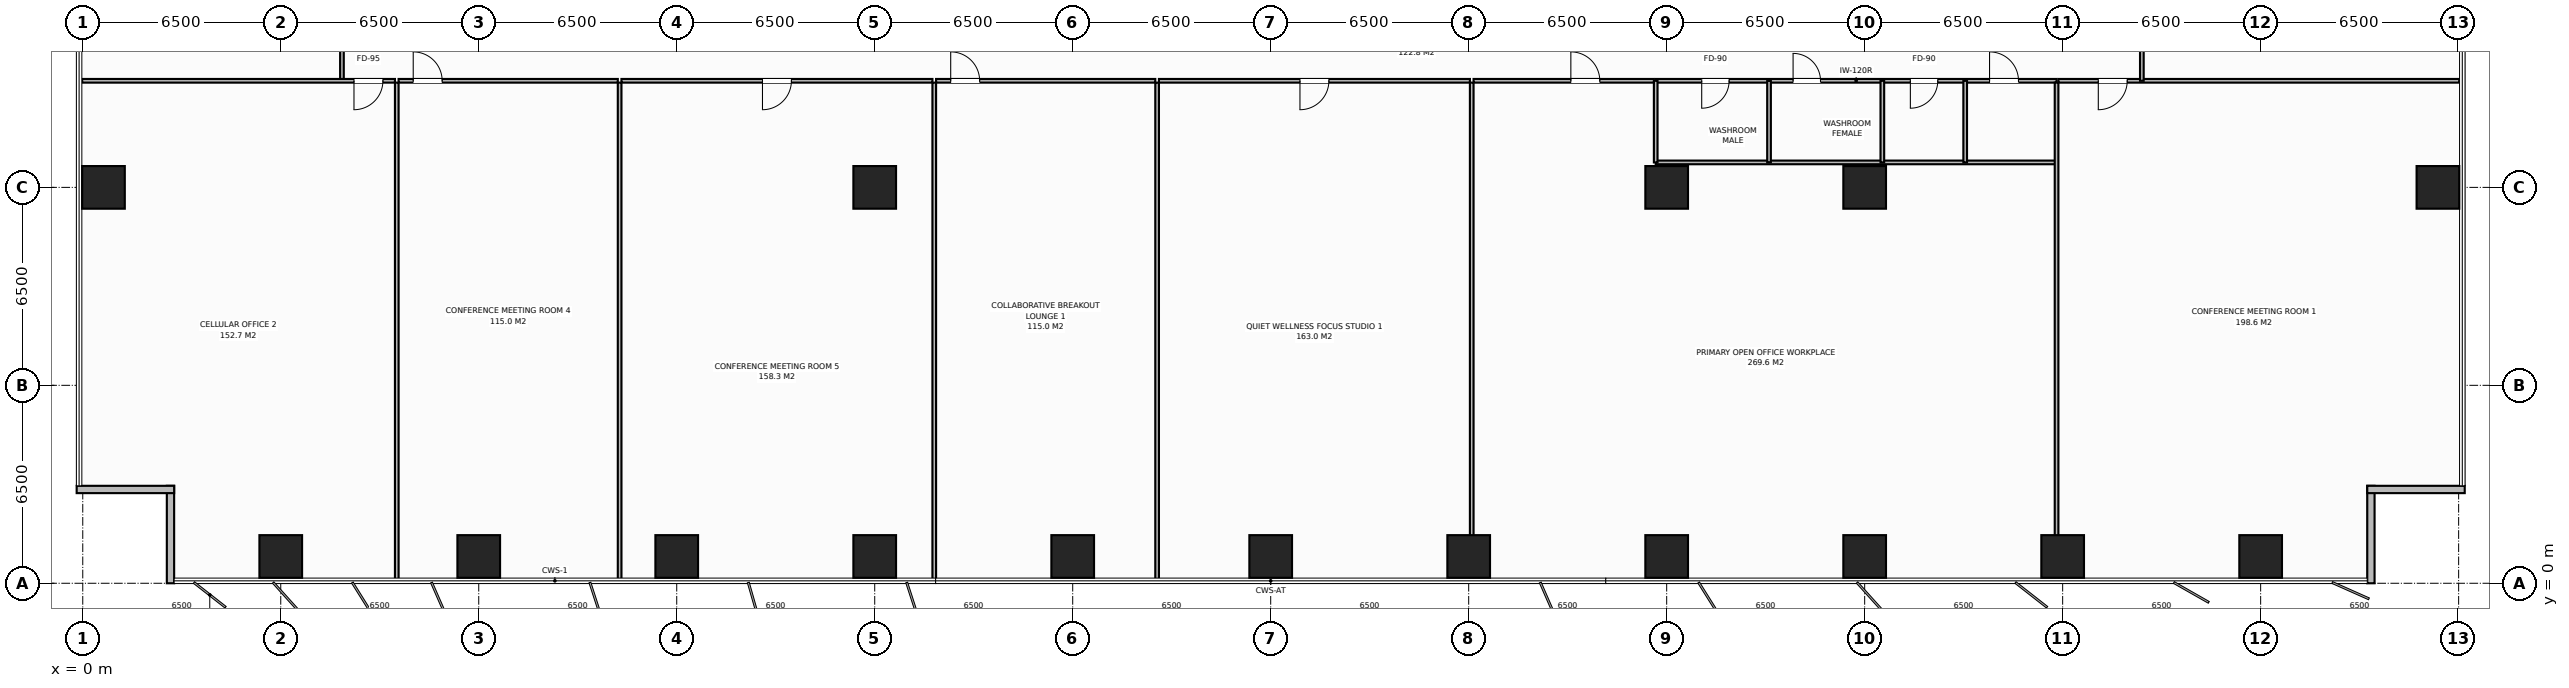
"""IFC4 building model, lengths in metres.
Left out: names, types, materials, properties, quantities, classifications, styles, units other than length and angle.
Written with IfcOpenShell. Run it as: python <this file> out.ifc"""

import sys

from ifc_helpers import new_model, si_unit, direction, frame, frame_2d, origin, origin_2d, place, context, subcontext, project, spatial, rectangle, extrude, element, fill, save


model = new_model("IFC4")
c1 = context("Model", 3, precision=1e-05, world=origin(), true_north=direction((0.0, 1.0)))
c2 = subcontext(c1, "Body", "Model", "MODEL_VIEW")
j1 = project(units=[si_unit("LENGTHUNIT", "METRE"), si_unit("PLANEANGLEUNIT", "RADIAN")], contexts=[c1])
p1 = place(None, origin())
s1 = spatial("IfcSite", under=j1, at=p1, CompositionType="ELEMENT")
p2 = place(p1, origin())
s2 = spatial("IfcBuilding", under=s1, at=p2, CompositionType="ELEMENT")
p3 = place(p2, frame((0.0, 0.0, 65.8)))
s3 = spatial("IfcBuildingStorey", under=s2, at=p3, CompositionType="ELEMENT", Elevation=65.8)
for number, where, z_axis, x_axis in (
    (1, (58.5, 13.0, 0.0), (0.0, 0.0, 1.0), (1.0, 0.0, 0.0)),
    (2, (26.0, 13.0, 0.0), (0.0, 0.0, 1.0), (1.0, 0.0, 0.0)),
    (3, (52.0, 13.0, 0.0), (0.0, 0.0, 1.0), (1.0, 0.0, 0.0)),
    (4, (6.5, 0.88, 0.0), (0.0, 0.0, 1.0), (1.0, 0.0, 0.0)),
    (5, (13.0, 0.88, 0.0), (0.0, 0.0, 1.0), (1.0, 0.0, 0.0)),
    (6, (19.5, 0.88, 0.0), (0.0, 0.0, 1.0), (1.0, 0.0, 0.0)),
    (7, (26.0, 0.88, 0.0), (0.0, 0.0, 1.0), (1.0, 0.0, 0.0)),
    (8, (32.5, 0.88, 0.0), (0.0, 0.0, 1.0), (1.0, 0.0, 0.0)),
    (9, (39.0, 0.88, 0.0), (0.0, 0.0, 1.0), (1.0, 0.0, 0.0)),
    (10, (45.5, 0.88, 0.0), (0.0, 0.0, 1.0), (1.0, 0.0, 0.0)),
    (11, (52.0, 0.88, 0.0), (0.0, 0.0, 1.0), (1.0, 0.0, 0.0)),
    (12, (58.5, 0.88, 0.0), (0.0, 0.0, 1.0), (1.0, 0.0, 0.0)),
    (13, (65.0, 0.88, 0.0), (0.0, 0.0, 1.0), (1.0, 0.0, 0.0)),
    (14, (71.5, 0.88, 0.0), (0.0, 0.0, 1.0), (1.0, 0.0, 0.0)),
    (15, (0.68, 13.0, 0.0), (0.0, 0.0, 1.0), (1.0, 0.0, 0.0)),
    (16, (77.32, 13.0, 0.0), (0.0, 0.0, 1.0), (1.0, 0.0, 0.0)),
):
    element("IfcColumn", number, at=place(p3, frame(where, z_axis=z_axis, x_axis=x_axis)), inside=s3, PredefinedType="COLUMN", context=c2, shape_type="SweptSolid", body=[
        extrude(rectangle(XDim=1.4, YDim=1.4, at=origin_2d()), origin(), (0.0, 0.0, 1.0), 3.8),
    ])
for number, where, z_axis, x_axis in (
    (17, (2.88, 0.0, 0.0), (0.0, 0.0, 1.0), (0.0, 1.0, 0.0)),
    (18, (3.0, 3.08, 0.0), (0.0, 0.0, 1.0), (-1.0, 0.0, 0.0)),
    (19, (75.12, 3.2, 0.0), (0.0, 0.0, 1.0), (0.0, -1.0, 0.0)),
    (20, (78.2, 3.08, 0.0), (0.0, 0.0, 1.0), (-1.0, 0.0, 0.0)),
):
    element("IfcWall", number, at=place(p3, frame(where, z_axis=z_axis, x_axis=x_axis)), inside=s3, PredefinedType="STANDARD", context=c2, shape_type="SweptSolid", body=[
        extrude(rectangle(XDim=3.2, YDim=0.24, at=frame_2d((1.6, 0.0))), origin(), (0.0, 0.0, 1.0), 3.55),
    ])
p4 = place(p3, frame((8.509, 16.5, 0.0), z_axis=(0.0, 0.0, 1.0), x_axis=(0.0, 1.0, 0.0)))
e21 = element("IfcWall", 21, at=p4, inside=s3, PredefinedType="PARTITIONING", context=c2, shape_type="SweptSolid", body=[
    extrude(rectangle(XDim=2.1, YDim=0.12, at=frame_2d((1.05, 0.0))), origin(), (0.0, 0.0, 1.0), 3.55),
])
p5 = place(p3, frame((51.64, 16.5, 0.0), z_axis=(0.0, 0.0, 1.0), x_axis=(1.0, 0.0, 0.0)))
e22 = element("IfcWall", 22, at=p5, inside=s3, PredefinedType="PARTITIONING", context=c2, shape_type="SweptSolid", body=[
    extrude(rectangle(XDim=13.16, YDim=0.12, at=frame_2d((6.58, 0.0))), origin(), (0.0, 0.0, 1.0), 3.55),
])
p6 = place(p5, frame((1.51, 0.0, 0.0)))
e23 = element("IfcOpeningElement", 23, at=p6, cuts=e22, PredefinedType="OPENING", context=c2, shape_type="SweptSolid", body=[
    extrude(rectangle(XDim=0.9, YDim=2.15, at=frame_2d((0.45, 1.075))), frame((0.0, 0.07, 0.0), z_axis=(0.0, -1.0, 0.0), x_axis=(1.0, 0.0, 0.0)), (0.0, 0.0, 1.0), 0.14),
])
p7 = place(p5, frame((4.51, 0.0, 0.0)))
e24 = element("IfcOpeningElement", 24, at=p7, cuts=e22, PredefinedType="OPENING", context=c2, shape_type="SweptSolid", body=[
    extrude(rectangle(XDim=0.9, YDim=2.15, at=frame_2d((0.45, 1.075))), frame((0.0, 0.07, 0.0), z_axis=(0.0, -1.0, 0.0), x_axis=(1.0, 0.0, 0.0)), (0.0, 0.0, 1.0), 0.14),
])
p8 = place(p5, frame((8.36, 0.0, 0.0)))
e25 = element("IfcOpeningElement", 25, at=p8, cuts=e22, PredefinedType="OPENING", context=c2, shape_type="SweptSolid", body=[
    extrude(rectangle(XDim=0.9, YDim=2.15, at=frame_2d((0.45, 1.075))), frame((0.0, 0.07, 0.0), z_axis=(0.0, -1.0, 0.0), x_axis=(1.0, 0.0, 0.0)), (0.0, 0.0, 1.0), 0.14),
])
p9 = place(p5, frame((10.96, 0.0, 0.0)))
e26 = element("IfcOpeningElement", 26, at=p9, cuts=e22, PredefinedType="OPENING", context=c2, shape_type="SweptSolid", body=[
    extrude(rectangle(XDim=0.95, YDim=2.15, at=frame_2d((0.475, 1.075))), frame((0.0, 0.07, 0.0), z_axis=(0.0, -1.0, 0.0), x_axis=(1.0, 0.0, 0.0)), (0.0, 0.0, 1.0), 0.14),
])
p10 = place(p3, frame((51.64, 13.82, 0.0), z_axis=(0.0, 0.0, 1.0), x_axis=(1.0, 0.0, 0.0)))
e27 = element("IfcWall", 27, at=p10, inside=s3, PredefinedType="PARTITIONING", context=c2, shape_type="SweptSolid", body=[
    extrude(rectangle(XDim=13.16, YDim=0.12, at=frame_2d((6.58, 0.0))), origin(), (0.0, 0.0, 1.0), 3.55),
])
for number, where, z_axis, x_axis in (
    (28, (51.64, 13.82, 0.0), (0.0, 0.0, 1.0), (0.0, 1.0, 0.0)),
    (29, (55.36, 13.82, 0.0), (0.0, 0.0, 1.0), (0.0, 1.0, 0.0)),
    (30, (59.08, 13.82, 0.0), (0.0, 0.0, 1.0), (0.0, 1.0, 0.0)),
    (31, (61.8, 13.82, 0.0), (0.0, 0.0, 1.0), (0.0, 1.0, 0.0)),
):
    element("IfcWall", number, at=place(p3, frame(where, z_axis=z_axis, x_axis=x_axis)), inside=s3, PredefinedType="PARTITIONING", context=c2, shape_type="SweptSolid", body=[
        extrude(rectangle(XDim=2.68, YDim=0.12, at=frame_2d((1.34, 0.0))), origin(), (0.0, 0.0, 1.0), 3.55),
    ])
p11 = place(p3, frame((10.309, 0.02, 0.0), z_axis=(0.0, 0.0, 1.0), x_axis=(0.0, 1.0, 0.0)))
e32 = element("IfcWall", 32, at=p11, inside=s3, PredefinedType="PARTITIONING", context=c2, shape_type="SweptSolid", body=[
    extrude(rectangle(XDim=16.42, YDim=0.12, at=frame_2d((8.21, 0.0))), origin(), (0.0, 0.0, 1.0), 3.55),
])
p12 = place(p3, frame((-0.02, 16.5, 0.0), z_axis=(0.0, 0.0, 1.0), x_axis=(1.0, 0.0, 0.0)))
e33 = element("IfcWall", 33, at=p12, inside=s3, PredefinedType="PARTITIONING", context=c2, shape_type="SweptSolid", body=[
    extrude(rectangle(XDim=10.269, YDim=0.12, at=frame_2d((5.135, 0.0))), origin(), (0.0, 0.0, 1.0), 3.55),
])
p13 = place(p12, frame((8.924, 0.0, 0.0)))
e34 = element("IfcOpeningElement", 34, at=p13, cuts=e33, PredefinedType="OPENING", context=c2, shape_type="SweptSolid", body=[
    extrude(rectangle(XDim=0.95, YDim=2.15, at=frame_2d((0.475, 1.075))), frame((0.0, 0.07, 0.0), z_axis=(0.0, -1.0, 0.0), x_axis=(1.0, 0.0, 0.0)), (0.0, 0.0, 1.0), 0.14),
])
p14 = place(p3, frame((17.625, 0.02, 0.0), z_axis=(0.0, 0.0, 1.0), x_axis=(0.0, 1.0, 0.0)))
e35 = element("IfcWall", 35, at=p14, inside=s3, PredefinedType="PARTITIONING", context=c2, shape_type="SweptSolid", body=[
    extrude(rectangle(XDim=16.42, YDim=0.12, at=frame_2d((8.21, 0.0))), origin(), (0.0, 0.0, 1.0), 3.55),
])
p15 = place(p3, frame((10.369, 16.5, 0.0), z_axis=(0.0, 0.0, 1.0), x_axis=(1.0, 0.0, 0.0)))
e36 = element("IfcWall", 36, at=p15, inside=s3, PredefinedType="PARTITIONING", context=c2, shape_type="SweptSolid", body=[
    extrude(rectangle(XDim=7.196, YDim=0.12, at=frame_2d((3.598, 0.0))), origin(), (0.0, 0.0, 1.0), 3.55),
])
p16 = place(p15, frame((0.48, 0.0, 0.0)))
e37 = element("IfcOpeningElement", 37, at=p16, cuts=e36, PredefinedType="OPENING", context=c2, shape_type="SweptSolid", body=[
    extrude(rectangle(XDim=0.95, YDim=2.15, at=frame_2d((0.475, 1.075))), frame((0.0, 0.07, 0.0), z_axis=(0.0, -1.0, 0.0), x_axis=(1.0, 0.0, 0.0)), (0.0, 0.0, 1.0), 0.14),
])
p17 = place(p3, frame((27.955, 0.02, 0.0), z_axis=(0.0, 0.0, 1.0), x_axis=(0.0, 1.0, 0.0)))
e38 = element("IfcWall", 38, at=p17, inside=s3, PredefinedType="PARTITIONING", context=c2, shape_type="SweptSolid", body=[
    extrude(rectangle(XDim=16.42, YDim=0.12, at=frame_2d((8.21, 0.0))), origin(), (0.0, 0.0, 1.0), 3.55),
])
p18 = place(p3, frame((17.686, 16.5, 0.0), z_axis=(0.0, 0.0, 1.0), x_axis=(1.0, 0.0, 0.0)))
e39 = element("IfcWall", 39, at=p18, inside=s3, PredefinedType="PARTITIONING", context=c2, shape_type="SweptSolid", body=[
    extrude(rectangle(XDim=10.209, YDim=0.12, at=frame_2d((5.104, 0.0))), origin(), (0.0, 0.0, 1.0), 3.55),
])
p19 = place(p18, frame((4.629, 0.0, 0.0)))
e40 = element("IfcOpeningElement", 40, at=p19, cuts=e39, PredefinedType="OPENING", context=c2, shape_type="SweptSolid", body=[
    extrude(rectangle(XDim=0.95, YDim=2.15, at=frame_2d((0.475, 1.075))), frame((0.0, 0.07, 0.0), z_axis=(0.0, -1.0, 0.0), x_axis=(1.0, 0.0, 0.0)), (0.0, 0.0, 1.0), 0.14),
])
p20 = place(p3, frame((35.271, 0.02, 0.0), z_axis=(0.0, 0.0, 1.0), x_axis=(0.0, 1.0, 0.0)))
e41 = element("IfcWall", 41, at=p20, inside=s3, PredefinedType="PARTITIONING", context=c2, shape_type="SweptSolid", body=[
    extrude(rectangle(XDim=16.42, YDim=0.12, at=frame_2d((8.21, 0.0))), origin(), (0.0, 0.0, 1.0), 3.55),
])
p21 = place(p3, frame((28.014, 16.5, 0.0), z_axis=(0.0, 0.0, 1.0), x_axis=(1.0, 0.0, 0.0)))
e42 = element("IfcWall", 42, at=p21, inside=s3, PredefinedType="PARTITIONING", context=c2, shape_type="SweptSolid", body=[
    extrude(rectangle(XDim=7.197, YDim=0.12, at=frame_2d((3.598, 0.0))), origin(), (0.0, 0.0, 1.0), 3.55),
])
p22 = place(p21, frame((0.48, 0.0, 0.0)))
e43 = element("IfcOpeningElement", 43, at=p22, cuts=e42, PredefinedType="OPENING", context=c2, shape_type="SweptSolid", body=[
    extrude(rectangle(XDim=0.95, YDim=2.15, at=frame_2d((0.475, 1.075))), frame((0.0, 0.07, 0.0), z_axis=(0.0, -1.0, 0.0), x_axis=(1.0, 0.0, 0.0)), (0.0, 0.0, 1.0), 0.14),
])
p23 = place(p3, frame((45.6, 0.02, 0.0), z_axis=(0.0, 0.0, 1.0), x_axis=(0.0, 1.0, 0.0)))
e44 = element("IfcWall", 44, at=p23, inside=s3, PredefinedType="PARTITIONING", context=c2, shape_type="SweptSolid", body=[
    extrude(rectangle(XDim=16.42, YDim=0.12, at=frame_2d((8.21, 0.0))), origin(), (0.0, 0.0, 1.0), 2.9),
])
p24 = place(p3, frame((35.331, 16.5, 0.0), z_axis=(0.0, 0.0, 1.0), x_axis=(1.0, 0.0, 0.0)))
e45 = element("IfcWall", 45, at=p24, inside=s3, PredefinedType="PARTITIONING", context=c2, shape_type="SweptSolid", body=[
    extrude(rectangle(XDim=10.209, YDim=0.12, at=frame_2d((5.104, 0.0))), origin(), (0.0, 0.0, 1.0), 3.55),
])
p25 = place(p24, frame((4.63, 0.0, 0.0)))
e46 = element("IfcOpeningElement", 46, at=p25, cuts=e45, PredefinedType="OPENING", context=c2, shape_type="SweptSolid", body=[
    extrude(rectangle(XDim=0.95, YDim=2.15, at=frame_2d((0.475, 1.075))), frame((0.0, 0.07, 0.0), z_axis=(0.0, -1.0, 0.0), x_axis=(1.0, 0.0, 0.0)), (0.0, 0.0, 1.0), 0.14),
])
p26 = place(p3, frame((64.8, 0.02, 0.0), z_axis=(0.0, 0.0, 1.0), x_axis=(0.0, 1.0, 0.0)))
e47 = element("IfcWall", 47, at=p26, inside=s3, PredefinedType="PARTITIONING", context=c2, shape_type="SweptSolid", body=[
    extrude(rectangle(XDim=16.42, YDim=0.12, at=frame_2d((8.21, 0.0))), origin(), (0.0, 0.0, 1.0), 2.9),
])
p27 = place(p3, frame((45.66, 16.5, 0.0), z_axis=(0.0, 0.0, 1.0), x_axis=(1.0, 0.0, 0.0)))
e48 = element("IfcWall", 48, at=p27, inside=s3, PredefinedType="PARTITIONING", context=c2, shape_type="SweptSolid", body=[
    extrude(rectangle(XDim=5.92, YDim=0.12, at=frame_2d((2.96, 0.0))), origin(), (0.0, 0.0, 1.0), 3.55),
])
p28 = place(p27, frame((3.194, 0.0, 0.0)))
e49 = element("IfcOpeningElement", 49, at=p28, cuts=e48, PredefinedType="OPENING", context=c2, shape_type="SweptSolid", body=[
    extrude(rectangle(XDim=0.95, YDim=2.15, at=frame_2d((0.475, 1.075))), frame((0.0, 0.07, 0.0), z_axis=(0.0, -1.0, 0.0), x_axis=(1.0, 0.0, 0.0)), (0.0, 0.0, 1.0), 0.14),
])
p29 = place(p3, frame((64.86, 16.5, 0.0), z_axis=(0.0, 0.0, 1.0), x_axis=(1.0, 0.0, 0.0)))
e50 = element("IfcWall", 50, at=p29, inside=s3, PredefinedType="PARTITIONING", context=c2, shape_type="SweptSolid", body=[
    extrude(rectangle(XDim=13.16, YDim=0.12, at=frame_2d((6.58, 0.0))), origin(), (0.0, 0.0, 1.0), 3.55),
])
p30 = place(p29, frame((1.31, 0.0, 0.0)))
e51 = element("IfcOpeningElement", 51, at=p30, cuts=e50, PredefinedType="OPENING", context=c2, shape_type="SweptSolid", body=[
    extrude(rectangle(XDim=0.95, YDim=2.15, at=frame_2d((0.475, 1.075))), frame((0.0, 0.07, 0.0), z_axis=(0.0, -1.0, 0.0), x_axis=(1.0, 0.0, 0.0)), (0.0, 0.0, 1.0), 0.14),
])
p31 = place(p3, frame((67.6, 16.5, 0.0), z_axis=(0.0, 0.0, 1.0), x_axis=(0.0, 1.0, 0.0)))
e52 = element("IfcWall", 52, at=p31, inside=s3, PredefinedType="PARTITIONING", context=c2, shape_type="SweptSolid", body=[
    extrude(rectangle(XDim=9.5, YDim=0.12, at=frame_2d((4.75, 0.0))), origin(), (0.0, 0.0, 1.0), 3.55),
])
p32 = place(p31, frame((5.325, 0.0, 0.0)))
e53 = element("IfcOpeningElement", 53, at=p32, cuts=e52, PredefinedType="OPENING", context=c2, shape_type="SweptSolid", body=[
    extrude(rectangle(XDim=0.95, YDim=2.15, at=frame_2d((0.475, 1.075))), frame((0.0, 0.07, 0.0), z_axis=(0.0, -1.0, 0.0), x_axis=(1.0, 0.0, 0.0)), (0.0, 0.0, 1.0), 0.14),
])
p33 = place(p6, origin())
e54 = element("IfcDoor", 54, at=p33, inside=s3, OperationType="SINGLE_SWING_RIGHT", PredefinedType="DOOR", context=c2, shape_type="SweptSolid", body=[
    extrude(rectangle(XDim=0.9, YDim=2.15, at=frame_2d((0.45, 1.075))), frame((0.0, 0.025, 0.0), z_axis=(0.0, -1.0, 0.0), x_axis=(1.0, 0.0, 0.0)), (0.0, 0.0, 1.0), 0.05),
])
fill(e23, e54)
p34 = place(p7, origin())
e55 = element("IfcDoor", 55, at=p34, inside=s3, OperationType="SINGLE_SWING_LEFT", PredefinedType="DOOR", context=c2, shape_type="SweptSolid", body=[
    extrude(rectangle(XDim=0.9, YDim=2.15, at=frame_2d((0.45, 1.075))), frame((0.0, 0.025, 0.0), z_axis=(0.0, -1.0, 0.0), x_axis=(1.0, 0.0, 0.0)), (0.0, 0.0, 1.0), 0.05),
])
fill(e24, e55)
p35 = place(p8, origin())
e56 = element("IfcDoor", 56, at=p35, inside=s3, OperationType="SINGLE_SWING_RIGHT", PredefinedType="DOOR", context=c2, shape_type="SweptSolid", body=[
    extrude(rectangle(XDim=0.9, YDim=2.15, at=frame_2d((0.45, 1.075))), frame((0.0, 0.025, 0.0), z_axis=(0.0, -1.0, 0.0), x_axis=(1.0, 0.0, 0.0)), (0.0, 0.0, 1.0), 0.05),
])
fill(e25, e56)
p36 = place(p9, origin())
e57 = element("IfcDoor", 57, at=p36, inside=s3, OperationType="SINGLE_SWING_LEFT", PredefinedType="DOOR", context=c2, shape_type="SweptSolid", body=[
    extrude(rectangle(XDim=0.95, YDim=2.15, at=frame_2d((0.475, 1.075))), frame((0.0, 0.025, 0.0), z_axis=(0.0, -1.0, 0.0), x_axis=(1.0, 0.0, 0.0)), (0.0, 0.0, 1.0), 0.05),
])
fill(e26, e57)
p37 = place(p13, origin())
e58 = element("IfcDoor", 58, at=p37, inside=s3, OperationType="SINGLE_SWING_RIGHT", PredefinedType="DOOR", context=c2, shape_type="SweptSolid", body=[
    extrude(rectangle(XDim=0.95, YDim=2.15, at=frame_2d((0.475, 1.075))), frame((0.0, 0.025, 0.0), z_axis=(0.0, -1.0, 0.0), x_axis=(1.0, 0.0, 0.0)), (0.0, 0.0, 1.0), 0.05),
])
fill(e34, e58)
p38 = place(p16, origin())
e59 = element("IfcDoor", 59, at=p38, inside=s3, OperationType="SINGLE_SWING_LEFT", PredefinedType="DOOR", context=c2, shape_type="SweptSolid", body=[
    extrude(rectangle(XDim=0.95, YDim=2.15, at=frame_2d((0.475, 1.075))), frame((0.0, 0.025, 0.0), z_axis=(0.0, -1.0, 0.0), x_axis=(1.0, 0.0, 0.0)), (0.0, 0.0, 1.0), 0.05),
])
fill(e37, e59)
p39 = place(p19, origin())
e60 = element("IfcDoor", 60, at=p39, inside=s3, OperationType="SINGLE_SWING_RIGHT", PredefinedType="DOOR", context=c2, shape_type="SweptSolid", body=[
    extrude(rectangle(XDim=0.95, YDim=2.15, at=frame_2d((0.475, 1.075))), frame((0.0, 0.025, 0.0), z_axis=(0.0, -1.0, 0.0), x_axis=(1.0, 0.0, 0.0)), (0.0, 0.0, 1.0), 0.05),
])
fill(e40, e60)
p40 = place(p22, origin())
e61 = element("IfcDoor", 61, at=p40, inside=s3, OperationType="SINGLE_SWING_LEFT", PredefinedType="DOOR", context=c2, shape_type="SweptSolid", body=[
    extrude(rectangle(XDim=0.95, YDim=2.15, at=frame_2d((0.475, 1.075))), frame((0.0, 0.025, 0.0), z_axis=(0.0, -1.0, 0.0), x_axis=(1.0, 0.0, 0.0)), (0.0, 0.0, 1.0), 0.05),
])
fill(e43, e61)
p41 = place(p25, origin())
e62 = element("IfcDoor", 62, at=p41, inside=s3, OperationType="SINGLE_SWING_RIGHT", PredefinedType="DOOR", context=c2, shape_type="SweptSolid", body=[
    extrude(rectangle(XDim=0.95, YDim=2.15, at=frame_2d((0.475, 1.075))), frame((0.0, 0.025, 0.0), z_axis=(0.0, -1.0, 0.0), x_axis=(1.0, 0.0, 0.0)), (0.0, 0.0, 1.0), 0.05),
])
fill(e46, e62)
p42 = place(p28, origin())
e63 = element("IfcDoor", 63, at=p42, inside=s3, OperationType="SINGLE_SWING_LEFT", PredefinedType="DOOR", context=c2, shape_type="SweptSolid", body=[
    extrude(rectangle(XDim=0.95, YDim=2.15, at=frame_2d((0.475, 1.075))), frame((0.0, 0.025, 0.0), z_axis=(0.0, -1.0, 0.0), x_axis=(1.0, 0.0, 0.0)), (0.0, 0.0, 1.0), 0.05),
])
fill(e49, e63)
p43 = place(p30, origin())
e64 = element("IfcDoor", 64, at=p43, inside=s3, OperationType="SINGLE_SWING_RIGHT", PredefinedType="DOOR", context=c2, shape_type="SweptSolid", body=[
    extrude(rectangle(XDim=0.95, YDim=2.15, at=frame_2d((0.475, 1.075))), frame((0.0, 0.025, 0.0), z_axis=(0.0, -1.0, 0.0), x_axis=(1.0, 0.0, 0.0)), (0.0, 0.0, 1.0), 0.05),
])
fill(e51, e64)
save(model, sys.argv[1])
